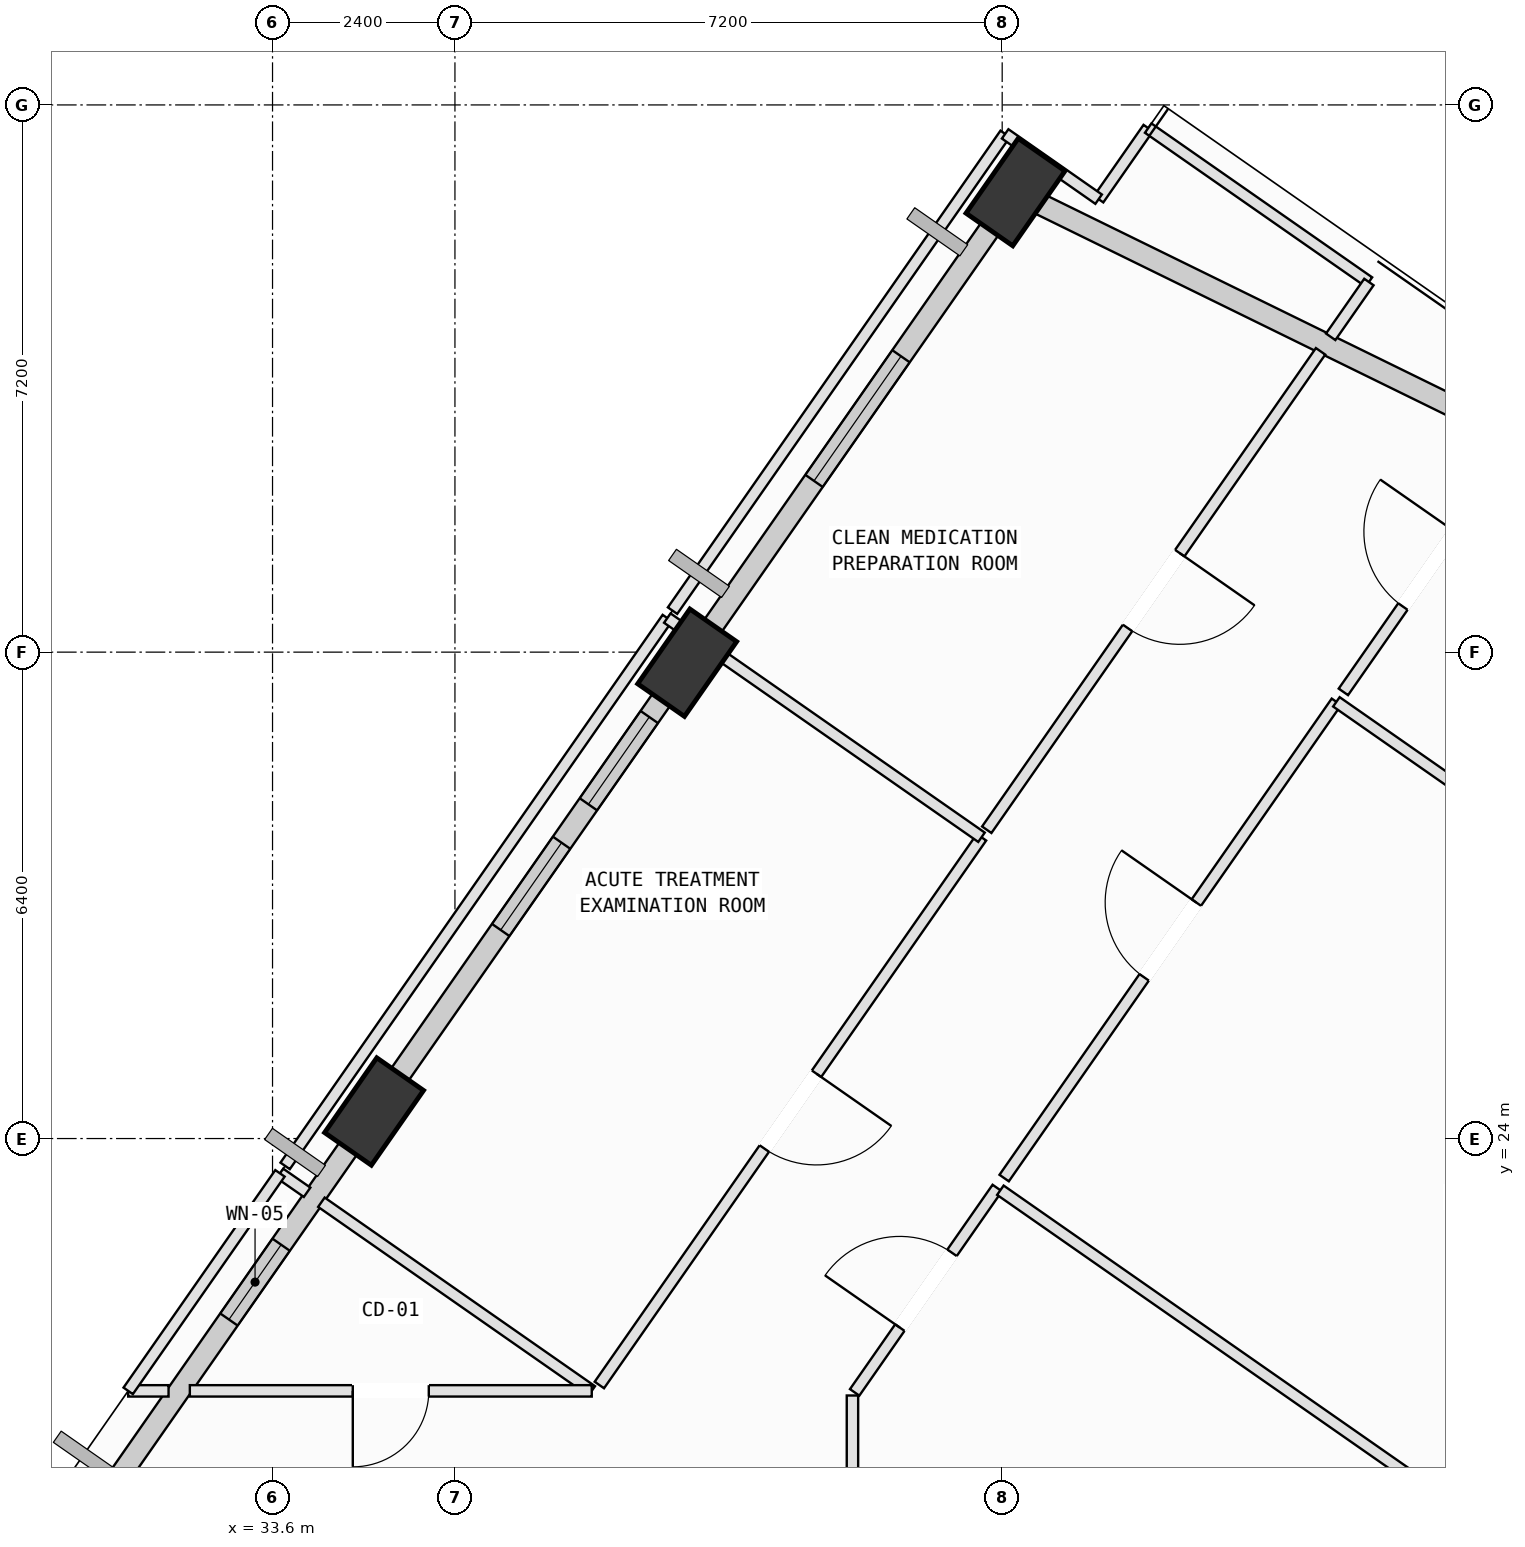
"""IFC4 building model, lengths in metres.
Left out: names, types, materials, properties, quantities, classifications, styles, units other than length and angle.
Written with IfcOpenShell. Run it as: python <this file> out.ifc"""

import sys

from ifc_helpers import new_model, si_unit, direction, frame, frame_2d, origin, origin_2d, place, context, subcontext, project, spatial, rectangle, extrude, element, fill, save


model = new_model("IFC4")
c1 = context("Model", 3, precision=1e-05, world=origin(), true_north=direction((0.0, 1.0)))
c2 = subcontext(c1, "Body", "Model", "MODEL_VIEW")
j1 = project(units=[si_unit("LENGTHUNIT", "METRE"), si_unit("PLANEANGLEUNIT", "RADIAN")], contexts=[c1])
p1 = place(None, origin())
s1 = spatial("IfcSite", under=j1, at=p1, CompositionType="ELEMENT")
p2 = place(p1, origin())
s2 = spatial("IfcBuilding", under=s1, at=p2, CompositionType="ELEMENT")
p3 = place(p2, frame((0.0, 0.0, 259.2)))
s3 = spatial("IfcBuildingStorey", under=s2, at=p3, CompositionType="ELEMENT", Elevation=259.2)
p4 = place(p3, frame((43.375, 36.453, 0.002), z_axis=(-0.048592952398, 0.040057176569, 0.998015103885), x_axis=(0.267660876865, -0.962127864651, 0.051649076055)))
e1 = element("IfcColumn", 1, at=p4, inside=s3, PredefinedType="COLUMN", context=c2, shape_type="SweptSolid", body=[
    extrude(rectangle(XDim=1.2, YDim=0.75, at=origin_2d()), origin(), (0.0, 0.0, 1.0), 4.004),
])
p5 = place(p3, frame((39.055, 30.261, 0.002), z_axis=(-0.022775341042, 0.022408981669, 0.99948943035), x_axis=(0.183044669625, -0.982755287871, 0.026204829398)))
e2 = element("IfcColumn", 2, at=p5, inside=s3, PredefinedType="COLUMN", context=c2, shape_type="SweptSolid", body=[
    extrude(rectangle(XDim=1.2, YDim=0.75, at=origin_2d()), origin(), (0.0, 0.0, 1.0), 3.998),
])
p6 = place(p3, frame((34.936, 24.356, 0.002), z_axis=(0.001832701206, 0.005559193659, 0.999982868139), x_axis=(-0.800160526924, -0.599766691213, 0.004800756595)))
e3 = element("IfcColumn", 3, at=p6, inside=s3, PredefinedType="COLUMN", context=c2, shape_type="SweptSolid", body=[
    extrude(rectangle(XDim=1.2, YDim=0.75, at=origin_2d()), origin(), (0.0, 0.0, 1.0), 3.996),
])
p7 = place(p3, frame((43.621, 36.333, 0.0), z_axis=(0.0, 0.0, 1.0), x_axis=(0.897954429187, -0.440088449182, 0.0)))
e4 = element("IfcWall", 4, at=p7, inside=s3, PredefinedType="SOLIDWALL", context=c2, shape_type="SweptSolid", body=[
    extrude(rectangle(XDim=9.036, YDim=0.28, at=frame_2d((4.518, 0.0))), origin(), (0.0, 0.0, 1.0), 3.265),
])
p8 = place(p3, frame((39.286, 30.591, 0.0), z_axis=(0.0, 0.0, 1.0), x_axis=(0.572151742902, 0.820147781253, 0.0)))
e5 = element("IfcWall", 5, at=p8, inside=s3, PredefinedType="SOLIDWALL", context=c2, shape_type="SweptSolid", body=[
    extrude(rectangle(XDim=6.78, YDim=0.28, at=frame_2d((3.39, 0.0))), origin(), (0.0, 0.0, 1.0), 3.265),
])
p9 = place(p8, frame((2.514, 0.0, 0.75)))
e6 = element("IfcOpeningElement", 6, at=p9, cuts=e5, PredefinedType="OPENING", context=c2, shape_type="SweptSolid", body=[
    extrude(rectangle(XDim=2.0, YDim=1.95, at=frame_2d((1.0, 0.975))), frame((0.0, 0.15, 0.0), z_axis=(0.0, -1.0, 0.0), x_axis=(1.0, 0.0, 0.0)), (0.0, 0.0, 1.0), 0.3),
])
p10 = place(p3, frame((35.17, 24.691, 0.0), z_axis=(0.0, 0.0, 1.0), x_axis=(0.572139886834, 0.820156052159, 0.0)))
e7 = element("IfcWall", 7, at=p10, inside=s3, PredefinedType="SOLIDWALL", context=c2, shape_type="SweptSolid", body=[
    extrude(rectangle(XDim=6.409, YDim=0.28, at=frame_2d((3.205, 0.0))), origin(), (0.0, 0.0, 1.0), 3.265),
])
p11 = place(p10, frame((2.503, 0.0, 0.75)))
e8 = element("IfcOpeningElement", 8, at=p11, cuts=e7, PredefinedType="OPENING", context=c2, shape_type="SweptSolid", body=[
    extrude(rectangle(XDim=1.4, YDim=1.85, at=frame_2d((0.7, 0.925))), frame((0.0, 0.15, 0.0), z_axis=(0.0, -1.0, 0.0), x_axis=(1.0, 0.0, 0.0)), (0.0, 0.0, 1.0), 0.3),
])
p12 = place(p10, frame((4.52, 0.0, 0.75)))
e9 = element("IfcOpeningElement", 9, at=p12, cuts=e7, PredefinedType="OPENING", context=c2, shape_type="SweptSolid", body=[
    extrude(rectangle(XDim=1.4, YDim=1.85, at=frame_2d((0.7, 0.925))), frame((0.0, 0.15, 0.0), z_axis=(0.0, -1.0, 0.0), x_axis=(1.0, 0.0, 0.0)), (0.0, 0.0, 1.0), 0.3),
])
p13 = place(p3, frame((31.192, 18.988, 0.0), z_axis=(0.0, 0.0, 1.0), x_axis=(0.572160511302, 0.82014166417, 0.0)))
e10 = element("IfcWall", 10, at=p13, inside=s3, PredefinedType="SOLIDWALL", context=c2, shape_type="SweptSolid", body=[
    extrude(rectangle(XDim=6.158, YDim=0.28, at=frame_2d((3.079, 0.0))), origin(), (0.0, 0.0, 1.0), 3.265),
])
p14 = place(p13, frame((3.208, 0.0, 0.75)))
e11 = element("IfcOpeningElement", 11, at=p14, cuts=e10, PredefinedType="OPENING", context=c2, shape_type="SweptSolid", body=[
    extrude(rectangle(XDim=1.2, YDim=1.75, at=frame_2d((0.6, 0.875))), frame((0.0, 0.15, 0.0), z_axis=(0.0, -1.0, 0.0), x_axis=(1.0, 0.0, 0.0)), (0.0, 0.0, 1.0), 0.3),
])
p15 = place(p3, frame((24.972, 22.833, 0.0), z_axis=(0.0, 0.0, 1.0), x_axis=(0.820150694585, -0.572147566779, 0.0)))
e12 = element("IfcWall", 12, at=p15, inside=s3, PredefinedType="SOLIDWALL", context=c2, shape_type="SweptSolid", body=[
    extrude(rectangle(XDim=6.958, YDim=0.28, at=frame_2d((3.479, 0.0))), origin(), (0.0, 0.0, 1.0), 3.165),
])
p16 = place(p3, frame((41.23, 17.95, 0.0), z_axis=(0.0, 0.0, 1.0), x_axis=(0.0, 1.0, 0.0)))
e13 = element("IfcWall", 13, at=p16, inside=s3, PredefinedType="PARTITIONING", context=c2, shape_type="SweptSolid", body=[
    extrude(rectangle(XDim=2.669, YDim=0.15, at=frame_2d((1.334, 0.0))), origin(), (0.0, 0.0, 1.0), 3.78),
])
p17 = place(p3, frame((41.259, 20.66, 0.0), z_axis=(0.0, 0.0, 1.0), x_axis=(0.572137337348, 0.820157830672, 0.0)))
e14 = element("IfcWall", 14, at=p17, inside=s3, PredefinedType="PARTITIONING", context=c2, shape_type="SweptSolid", body=[
    extrude(rectangle(XDim=3.279, YDim=0.15, at=frame_2d((1.639, 0.0))), origin(), (0.0, 0.0, 1.0), 3.78),
])
p18 = place(p17, frame((1.039, 0.0, 0.0)))
e15 = element("IfcOpeningElement", 15, at=p18, cuts=e14, PredefinedType="OPENING", context=c2, shape_type="SweptSolid", body=[
    extrude(rectangle(XDim=1.2, YDim=2.15, at=frame_2d((0.6, 1.075))), frame((0.0, 0.085, 0.0), z_axis=(0.0, -1.0, 0.0), x_axis=(1.0, 0.0, 0.0)), (0.0, 0.0, 1.0), 0.17),
])
p19 = place(p3, frame((43.176, 23.32, 0.0), z_axis=(0.0, 0.0, 1.0), x_axis=(0.820147534675, -0.572152096358, 0.0)))
e16 = element("IfcWall", 16, at=p19, inside=s3, PredefinedType="PARTITIONING", context=c2, shape_type="SweptSolid", body=[
    extrude(rectangle(XDim=13.463, YDim=0.15, at=frame_2d((6.732, 0.0))), origin(), (0.0, 0.0, 1.0), 3.78),
])
p20 = place(p3, frame((43.226, 23.48, 0.0), z_axis=(0.0, 0.0, 1.0), x_axis=(0.572106115417, 0.820179610026, 0.0)))
e17 = element("IfcWall", 17, at=p20, inside=s3, PredefinedType="PARTITIONING", context=c2, shape_type="SweptSolid", body=[
    extrude(rectangle(XDim=7.64, YDim=0.15, at=frame_2d((3.82, 0.0))), origin(), (0.0, 0.0, 1.0), 3.78),
])
p21 = place(p20, frame((3.22, 0.0, 0.0)))
e18 = element("IfcOpeningElement", 18, at=p21, cuts=e17, PredefinedType="OPENING", context=c2, shape_type="SweptSolid", body=[
    extrude(rectangle(XDim=1.2, YDim=2.15, at=frame_2d((0.6, 1.075))), frame((0.0, 0.085, 0.0), z_axis=(0.0, -1.0, 0.0), x_axis=(1.0, 0.0, 0.0)), (0.0, 0.0, 1.0), 0.17),
])
p22 = place(p3, frame((47.597, 29.746, 0.0), z_axis=(0.0, 0.0, 1.0), x_axis=(0.820150255488, -0.572148196207, 0.0)))
e19 = element("IfcWall", 19, at=p22, inside=s3, PredefinedType="PARTITIONING", context=c2, shape_type="SweptSolid", body=[
    extrude(rectangle(XDim=13.149, YDim=0.15, at=frame_2d((6.574, 0.0))), origin(), (0.0, 0.0, 1.0), 3.78),
])
p23 = place(p3, frame((47.689, 29.877, 0.0), z_axis=(0.0, 0.0, 1.0), x_axis=(0.572088498576, 0.820191898154, 0.0)))
e20 = element("IfcWall", 20, at=p23, inside=s3, PredefinedType="PARTITIONING", context=c2, shape_type="SweptSolid", body=[
    extrude(rectangle(XDim=3.938, YDim=0.15, at=frame_2d((1.969, 0.0))), origin(), (0.0, 0.0, 1.0), 3.78),
])
p24 = place(p23, frame((1.369, 0.0, 0.0)))
e21 = element("IfcOpeningElement", 21, at=p24, cuts=e20, PredefinedType="OPENING", context=c2, shape_type="SweptSolid", body=[
    extrude(rectangle(XDim=1.2, YDim=2.15, at=frame_2d((0.6, 1.075))), frame((0.0, 0.085, 0.0), z_axis=(0.0, -1.0, 0.0), x_axis=(1.0, 0.0, 0.0)), (0.0, 0.0, 1.0), 0.17),
])
p25 = place(p3, frame((33.698, 23.542, 0.0), z_axis=(0.0, 0.0, 1.0), x_axis=(0.820126954301, -0.572181596024, 0.0)))
e22 = element("IfcWall", 22, at=p25, inside=s3, PredefinedType="PARTITIONING", context=c2, shape_type="SweptSolid", body=[
    extrude(rectangle(XDim=0.435, YDim=0.15, at=frame_2d((0.218, 0.0))), origin(), (0.0, 0.0, 1.0), 3.78),
])
p26 = place(p3, frame((34.243, 23.162, 0.0), z_axis=(0.0, 0.0, 1.0), x_axis=(0.820077197348, -0.572252907717, 0.0)))
e23 = element("IfcWall", 23, at=p26, inside=s3, PredefinedType="PARTITIONING", context=c2, shape_type="SweptSolid", body=[
    extrude(rectangle(XDim=4.338, YDim=0.15, at=frame_2d((2.169, 0.0))), origin(), (0.0, 0.0, 1.0), 3.78),
])
p27 = place(p3, frame((37.8, 20.68, 0.0), z_axis=(0.0, 0.0, 1.0), x_axis=(-1.0, 0.0, 0.0)))
e24 = element("IfcWall", 24, at=p27, inside=s3, PredefinedType="PARTITIONING", context=c2, shape_type="SweptSolid", body=[
    extrude(rectangle(XDim=5.288, YDim=0.15, at=frame_2d((2.644, 0.0))), origin(), (0.0, 0.0, 1.0), 3.415),
])
p28 = place(p27, frame((2.144, 0.0, 0.0)))
e25 = element("IfcOpeningElement", 25, at=p28, cuts=e24, PredefinedType="OPENING", context=c2, shape_type="SweptSolid", body=[
    extrude(rectangle(XDim=1.0, YDim=2.12, at=frame_2d((0.5, 1.06))), frame((0.0, 0.085, 0.0), z_axis=(0.0, -1.0, 0.0), x_axis=(1.0, 0.0, 0.0)), (0.0, 0.0, 1.0), 0.17),
])
p29 = place(p3, frame((32.232, 20.68, 0.0), z_axis=(0.0, 0.0, 1.0), x_axis=(-1.0, 0.0, 0.0)))
e26 = element("IfcWall", 26, at=p29, inside=s3, PredefinedType="PARTITIONING", context=c2, shape_type="SweptSolid", body=[
    extrude(rectangle(XDim=0.531, YDim=0.15, at=frame_2d((0.266, 0.0))), origin(), (0.0, 0.0, 1.0), 3.78),
])
p30 = place(p3, frame((31.701, 20.68, 0.0), z_axis=(0.0, 0.0, 1.0), x_axis=(0.572236307158, 0.820088781029, 0.0)))
e27 = element("IfcWall", 27, at=p30, inside=s3, PredefinedType="PARTITIONING", context=c2, shape_type="SweptSolid", body=[
    extrude(rectangle(XDim=3.49, YDim=0.15, at=frame_2d((1.745, 0.0))), origin(), (0.0, 0.0, 1.0), 3.78),
])
p31 = place(p3, frame((42.928, 27.964, 0.0), z_axis=(0.0, 0.0, 1.0), x_axis=(-0.572175077439, -0.820131502113, 0.0)))
e28 = element("IfcWall", 28, at=p31, inside=s3, PredefinedType="PARTITIONING", context=c2, shape_type="SweptSolid", body=[
    extrude(rectangle(XDim=8.788, YDim=0.15, at=frame_2d((4.394, 0.0))), origin(), (0.0, 0.0, 1.0), 3.78),
])
p32 = place(p31, frame((3.794, 0.0, 0.0)))
e29 = element("IfcOpeningElement", 29, at=p32, cuts=e28, PredefinedType="OPENING", context=c2, shape_type="SweptSolid", body=[
    extrude(rectangle(XDim=1.2, YDim=2.15, at=frame_2d((0.6, 1.075))), frame((0.0, 0.085, 0.0), z_axis=(0.0, -1.0, 0.0), x_axis=(1.0, 0.0, 0.0)), (0.0, 0.0, 1.0), 0.17),
])
p33 = place(p3, frame((33.766, 23.64, 0.0), z_axis=(0.0, 0.0, 1.0), x_axis=(0.572104245641, 0.820180914262, 0.0)))
e30 = element("IfcWall", 30, at=p33, inside=s3, PredefinedType="PARTITIONING", context=c2, shape_type="SweptSolid", body=[
    extrude(rectangle(XDim=8.788, YDim=0.15, at=frame_2d((4.394, 0.0))), origin(), (0.0, 0.0, 1.0), 3.265),
])
p34 = place(p3, frame((38.794, 30.848, 0.0), z_axis=(0.0, 0.0, 1.0), x_axis=(0.820179124448, -0.572106811548, 0.0)))
e31 = element("IfcWall", 31, at=p34, inside=s3, PredefinedType="PARTITIONING", context=c2, shape_type="SweptSolid", body=[
    extrude(rectangle(XDim=0.46, YDim=0.15, at=frame_2d((0.23, 0.0))), origin(), (0.0, 0.0, 1.0), 3.78),
])
p35 = place(p3, frame((39.319, 30.481, 0.0), z_axis=(0.0, 0.0, 1.0), x_axis=(0.820231700671, -0.572031430268, 0.0)))
e32 = element("IfcWall", 32, at=p35, inside=s3, PredefinedType="PARTITIONING", context=c2, shape_type="SweptSolid", body=[
    extrude(rectangle(XDim=4.4, YDim=0.15, at=frame_2d((2.2, 0.0))), origin(), (0.0, 0.0, 1.0), 3.78),
])
p36 = place(p3, frame((44.469, 36.36, 0.0), z_axis=(0.0, 0.0, 1.0), x_axis=(0.572124636032, 0.82016669089, 0.0)))
e33 = element("IfcWall", 33, at=p36, inside=s3, PredefinedType="PARTITIONING", context=c2, shape_type="SweptSolid", body=[
    extrude(rectangle(XDim=1.14, YDim=0.15, at=frame_2d((0.57, 0.0))), origin(), (0.0, 0.0, 1.0), 3.78),
])
p37 = place(p3, frame((45.121, 37.295, 0.0), z_axis=(0.0, 0.0, 1.0), x_axis=(0.820260896589, -0.571989564176, 0.0)))
e34 = element("IfcWall", 34, at=p37, inside=s3, PredefinedType="PARTITIONING", context=c2, shape_type="SweptSolid", body=[
    extrude(rectangle(XDim=3.54, YDim=0.15, at=frame_2d((1.77, 0.0))), origin(), (0.0, 0.0, 1.0), 3.78),
])
p38 = place(p3, frame((48.025, 35.27, 0.0), z_axis=(0.0, 0.0, 1.0), x_axis=(-0.572138151462, -0.82015726275, 0.0)))
e35 = element("IfcWall", 35, at=p38, inside=s3, PredefinedType="PARTITIONING", context=c2, shape_type="SweptSolid", body=[
    extrude(rectangle(XDim=0.879, YDim=0.15, at=frame_2d((0.439, 0.0))), origin(), (0.0, 0.0, 1.0), 3.78),
])
p39 = place(p3, frame((47.389, 34.358, 0.0), z_axis=(0.0, 0.0, 1.0), x_axis=(-0.572185078761, -0.820124524474, 0.0)))
e36 = element("IfcWall", 36, at=p39, inside=s3, PredefinedType="PARTITIONING", context=c2, shape_type="SweptSolid", body=[
    extrude(rectangle(XDim=7.676, YDim=0.15, at=frame_2d((3.838, 0.0))), origin(), (0.0, 0.0, 1.0), 3.78),
])
p40 = place(p39, frame((3.238, 0.0, 0.0)))
e37 = element("IfcOpeningElement", 37, at=p40, cuts=e36, PredefinedType="OPENING", context=c2, shape_type="SweptSolid", body=[
    extrude(rectangle(XDim=1.2, YDim=2.15, at=frame_2d((0.6, 1.075))), frame((0.0, 0.085, 0.0), z_axis=(0.0, -1.0, 0.0), x_axis=(1.0, 0.0, 0.0)), (0.0, 0.0, 1.0), 0.17),
])
p41 = place(p3, frame((38.863, 30.946, 0.0), z_axis=(0.0, 0.0, 1.0), x_axis=(0.572137657031, 0.820157607663, 0.0)))
e38 = element("IfcWall", 38, at=p41, inside=s3, PredefinedType="PARTITIONING", context=c2, shape_type="SweptSolid", body=[
    extrude(rectangle(XDim=7.648, YDim=0.15, at=frame_2d((3.824, 0.0))), origin(), (0.0, 0.0, 1.0), 3.265),
])
p42 = place(p3, frame((43.239, 37.219, 0.0), z_axis=(0.0, 0.0, 1.0), x_axis=(0.819888899146, -0.572522657244, 0.0)))
e39 = element("IfcWall", 39, at=p42, inside=s3, PredefinedType="PARTITIONING", context=c2, shape_type="SweptSolid", body=[
    extrude(rectangle(XDim=1.5, YDim=0.15, at=frame_2d((0.75, 0.0))), origin(), (0.0, 0.0, 1.0), 3.265),
])
p43 = place(p9, origin())
e40 = element("IfcWindow", 40, at=p43, inside=s3, PartitioningType="SINGLE_PANEL", PredefinedType="WINDOW", context=c2, shape_type="SweptSolid", body=[
    extrude(rectangle(XDim=2.0, YDim=1.95, at=frame_2d((1.0, 0.975))), frame((0.0, 0.03, 0.0), z_axis=(0.0, -1.0, 0.0), x_axis=(1.0, 0.0, 0.0)), (0.0, 0.0, 1.0), 0.06),
])
fill(e6, e40)
p44 = place(p11, origin())
e41 = element("IfcWindow", 41, at=p44, inside=s3, PartitioningType="SINGLE_PANEL", PredefinedType="WINDOW", context=c2, shape_type="SweptSolid", body=[
    extrude(rectangle(XDim=1.4, YDim=1.85, at=frame_2d((0.7, 0.925))), frame((0.0, 0.03, 0.0), z_axis=(0.0, -1.0, 0.0), x_axis=(1.0, 0.0, 0.0)), (0.0, 0.0, 1.0), 0.06),
])
fill(e8, e41)
p45 = place(p12, origin())
e42 = element("IfcWindow", 42, at=p45, inside=s3, PartitioningType="SINGLE_PANEL", PredefinedType="WINDOW", context=c2, shape_type="SweptSolid", body=[
    extrude(rectangle(XDim=1.4, YDim=1.85, at=frame_2d((0.7, 0.925))), frame((0.0, 0.03, 0.0), z_axis=(0.0, -1.0, 0.0), x_axis=(1.0, 0.0, 0.0)), (0.0, 0.0, 1.0), 0.06),
])
fill(e9, e42)
p46 = place(p14, origin())
e43 = element("IfcWindow", 43, at=p46, inside=s3, PartitioningType="SINGLE_PANEL", PredefinedType="WINDOW", context=c2, shape_type="SweptSolid", body=[
    extrude(rectangle(XDim=1.2, YDim=1.75, at=frame_2d((0.6, 0.875))), frame((0.0, 0.03, 0.0), z_axis=(0.0, -1.0, 0.0), x_axis=(1.0, 0.0, 0.0)), (0.0, 0.0, 1.0), 0.06),
])
fill(e11, e43)
p47 = place(p18, origin())
e44 = element("IfcDoor", 44, at=p47, inside=s3, OperationType="SINGLE_SWING_LEFT", PredefinedType="DOOR", context=c2, shape_type="SweptSolid", body=[
    extrude(rectangle(XDim=1.2, YDim=2.15, at=frame_2d((0.6, 1.075))), frame((0.0, 0.025, 0.0), z_axis=(0.0, -1.0, 0.0), x_axis=(1.0, 0.0, 0.0)), (0.0, 0.0, 1.0), 0.05),
])
fill(e15, e44)
p48 = place(p21, origin())
e45 = element("IfcDoor", 45, at=p48, inside=s3, OperationType="SINGLE_SWING_RIGHT", PredefinedType="DOOR", context=c2, shape_type="SweptSolid", body=[
    extrude(rectangle(XDim=1.2, YDim=2.15, at=frame_2d((0.6, 1.075))), frame((0.0, 0.025, 0.0), z_axis=(0.0, -1.0, 0.0), x_axis=(1.0, 0.0, 0.0)), (0.0, 0.0, 1.0), 0.05),
])
fill(e18, e45)
p49 = place(p24, origin())
e46 = element("IfcDoor", 46, at=p49, inside=s3, OperationType="SINGLE_SWING_RIGHT", PredefinedType="DOOR", context=c2, shape_type="SweptSolid", body=[
    extrude(rectangle(XDim=1.2, YDim=2.15, at=frame_2d((0.6, 1.075))), frame((0.0, 0.025, 0.0), z_axis=(0.0, -1.0, 0.0), x_axis=(1.0, 0.0, 0.0)), (0.0, 0.0, 1.0), 0.05),
])
fill(e21, e46)
p50 = place(p28, origin())
e47 = element("IfcDoor", 47, at=p50, inside=s3, OperationType="SINGLE_SWING_RIGHT", PredefinedType="DOOR", context=c2, shape_type="SweptSolid", body=[
    extrude(rectangle(XDim=1.0, YDim=2.12, at=frame_2d((0.5, 1.06))), frame((0.0, 0.025, 0.0), z_axis=(0.0, -1.0, 0.0), x_axis=(1.0, 0.0, 0.0)), (0.0, 0.0, 1.0), 0.05),
])
fill(e25, e47)
p51 = place(p32, origin())
e48 = element("IfcDoor", 48, at=p51, inside=s3, OperationType="SINGLE_SWING_LEFT", PredefinedType="DOOR", context=c2, shape_type="SweptSolid", body=[
    extrude(rectangle(XDim=1.2, YDim=2.15, at=frame_2d((0.6, 1.075))), frame((0.0, 0.025, 0.0), z_axis=(0.0, -1.0, 0.0), x_axis=(1.0, 0.0, 0.0)), (0.0, 0.0, 1.0), 0.05),
])
fill(e29, e48)
p52 = place(p40, origin())
e49 = element("IfcDoor", 49, at=p52, inside=s3, OperationType="SINGLE_SWING_LEFT", PredefinedType="DOOR", context=c2, shape_type="SweptSolid", body=[
    extrude(rectangle(XDim=1.2, YDim=2.15, at=frame_2d((0.6, 1.075))), frame((0.0, 0.025, 0.0), z_axis=(0.0, -1.0, 0.0), x_axis=(1.0, 0.0, 0.0)), (0.0, 0.0, 1.0), 0.05),
])
fill(e37, e49)
save(model, sys.argv[1])
